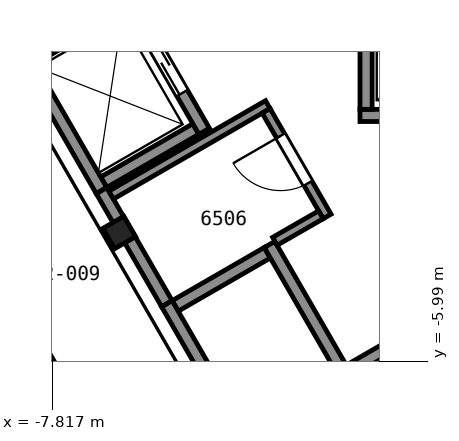
"""IFC4 building model, lengths in metres.
Left out: names, types, materials, properties, quantities, classifications, styles, units other than length and angle.
Written with IfcOpenShell. Run it as: python <this file> out.ifc"""

import sys

from ifc_helpers import new_model, si_unit, direction, frame, frame_2d, origin, origin_2d, place, context, subcontext, project, spatial, rectangle, i_section, extrude, element, fill, save


model = new_model("IFC4")
c1 = context("Model", 3, precision=1e-05, world=origin(), true_north=direction((0.0, 1.0)))
c2 = subcontext(c1, "Body", "Model", "MODEL_VIEW")
j1 = project(units=[si_unit("LENGTHUNIT", "METRE"), si_unit("PLANEANGLEUNIT", "RADIAN")], contexts=[c1])
p1 = place(None, origin())
s1 = spatial("IfcSite", under=j1, at=p1, CompositionType="ELEMENT")
p2 = place(p1, origin())
s2 = spatial("IfcBuilding", under=s1, at=p2, CompositionType="ELEMENT")
p3 = place(p2, frame((0.0, 0.0, 258.2)))
s3 = spatial("IfcBuildingStorey", under=s2, at=p3, CompositionType="ELEMENT", Elevation=258.2)
p4 = place(p3, frame((-6.923, -3.996, 0.04), z_axis=(0.175584774284, 0.101313376069, 0.979237247489), x_axis=(0.984300834882, 5.9817855e-05, -0.176498903317)))
e1 = element("IfcColumn", 1, at=p4, inside=s3, PredefinedType="COLUMN", context=c2, shape_type="SweptSolid", body=[
    extrude(i_section(OverallWidth=0.399, OverallDepth=0.386, WebThickness=0.021, FlangeThickness=0.033, FilletRadius=0.015, at=origin_2d()), origin(), (0.0, 0.0, 1.0), 5.841),
])
p5 = place(p3, frame((-2.755, -1.95, 0.0), z_axis=(0.0, 0.0, 1.0), x_axis=(1.0, 0.0, 0.0)))
e2 = element("IfcWall", 2, at=p5, inside=s3, PredefinedType="PARTITIONING", context=c2, shape_type="SweptSolid", body=[
    extrude(rectangle(XDim=7.25, YDim=0.2, at=frame_2d((3.625, 0.0))), origin(), (0.0, 0.0, 1.0), 5.55),
])
p6 = place(p5, frame((0.725, 0.0, 0.0)))
e3 = element("IfcOpeningElement", 3, at=p6, cuts=e2, PredefinedType="OPENING", context=c2, shape_type="SweptSolid", body=[
    extrude(rectangle(XDim=1.1, YDim=2.1, at=frame_2d((0.55, 1.05))), frame((0.0, 0.11, 0.0), z_axis=(0.0, -1.0, 0.0), x_axis=(1.0, 0.0, 0.0)), (0.0, 0.0, 1.0), 0.22),
])
p7 = place(p3, frame((-4.62, -7.118, 0.0), z_axis=(0.0, 0.0, 1.0), x_axis=(0.866039495442, 0.49997559174, 0.0)))
e4 = element("IfcWall", 4, at=p7, inside=s3, PredefinedType="PARTITIONING", context=c2, shape_type="SweptSolid", body=[
    extrude(rectangle(XDim=2.95, YDim=0.2, at=frame_2d((1.475, 0.0))), origin(), (0.0, 0.0, 1.0), 4.933),
])
for number, where, z_axis, x_axis in (
    (5, (-5.795, -5.083, 0.0), (0.0, 0.0, 1.0), (0.866, 0.5, 0.0)),
    (6, (-6.97, -3.048, 0.0), (0.0, 0.0, 1.0), (0.866, 0.5, 0.0)),
):
    element("IfcWall", number, at=place(p3, frame(where, z_axis=z_axis, x_axis=x_axis)), inside=s3, PredefinedType="PARTITIONING", context=c2, shape_type="SweptSolid", body=[
        extrude(rectangle(XDim=1.75, YDim=0.2, at=frame_2d((0.875, 0.0))), origin(), (0.0, 0.0, 1.0), 4.933),
    ])
p8 = place(p3, frame((-8.145, -1.013, 0.0), z_axis=(0.0, 0.0, 1.0), x_axis=(0.866016494683, 0.500015430699, 0.0)))
e7 = element("IfcWall", 7, at=p8, inside=s3, PredefinedType="PARTITIONING", context=c2, shape_type="SweptSolid", body=[
    extrude(rectangle(XDim=3.15, YDim=0.2, at=frame_2d((1.575, 0.0))), origin(), (0.0, 0.0, 1.0), 4.933),
])
p9 = place(p3, frame((-2.655, -1.85, 0.0), z_axis=(0.0, 0.0, 1.0), x_axis=(0.0, 1.0, 0.0)))
e8 = element("IfcWall", 8, at=p9, inside=s3, PredefinedType="PARTITIONING", context=c2, shape_type="SweptSolid", body=[
    extrude(rectangle(XDim=1.75, YDim=0.2, at=frame_2d((0.875, 0.0))), origin(), (0.0, 0.0, 1.0), 5.8),
])
p10 = place(p3, frame((-3.068, -6.107, 0.0), z_axis=(0.0, 0.0, 1.0), x_axis=(-0.499938297808, 0.866061024631, 0.0)))
e9 = element("IfcWall", 9, at=p10, inside=s3, PredefinedType="PARTITIONING", context=c2, shape_type="SweptSolid", body=[
    extrude(rectangle(XDim=2.35, YDim=0.2, at=frame_2d((1.175, 0.0))), origin(), (0.0, 0.0, 1.0), 5.55),
])
p11 = place(p3, frame((-5.318, -2.21, 0.0), z_axis=(0.0, 0.0, 1.0), x_axis=(-0.499938297808, 0.866061024631, 0.0)))
e10 = element("IfcWall", 10, at=p11, inside=s3, PredefinedType="PARTITIONING", context=c2, shape_type="SweptSolid", body=[
    extrude(rectangle(XDim=2.35, YDim=0.2, at=frame_2d((1.175, 0.0))), origin(), (0.0, 0.0, 1.0), 5.55),
])
p12 = place(p11, frame((0.725, 0.0, 0.0)))
e11 = element("IfcOpeningElement", 11, at=p12, cuts=e10, PredefinedType="OPENING", context=c2, shape_type="SweptSolid", body=[
    extrude(rectangle(XDim=1.1, YDim=2.1, at=frame_2d((0.55, 1.05))), frame((0.0, 0.11, 0.0), z_axis=(0.0, -1.0, 0.0), x_axis=(1.0, 0.0, 0.0)), (0.0, 0.0, 1.0), 0.22),
])
for number, where, z_axis, x_axis in (
    (12, (-4.656, -7.255, 0.0), (0.0, 0.0, 1.0), (-0.5, 0.866, 0.0)),
    (13, (-7.006, -3.185, 0.0), (0.0, 0.0, 1.0), (-0.5, 0.866, 0.0)),
):
    element("IfcWall", number, at=place(p3, frame(where, z_axis=z_axis, x_axis=x_axis)), inside=s3, PredefinedType="PARTITIONING", context=c2, shape_type="SweptSolid", body=[
        extrude(rectangle(XDim=2.55, YDim=0.2, at=frame_2d((1.275, 0.0))), origin(), (0.0, 0.0, 1.0), 5.55),
    ])
p13 = place(p3, frame((-7.005, -3.187, 0.0), z_axis=(0.0, 0.0, 1.0), x_axis=(0.50031363248, -0.86584425225, 0.0)))
e14 = element("IfcWall", 14, at=p13, inside=s3, PredefinedType="PARTITIONING", context=c2, shape_type="SweptSolid", body=[
    extrude(rectangle(XDim=2.145, YDim=0.2, at=frame_2d((1.072, 0.0))), origin(), (0.0, 0.0, 1.0), 5.19),
])
p14 = place(p3, frame((-6.847, -3.26, 0.0), z_axis=(0.0, 0.0, 1.0), x_axis=(0.866017493347, 0.500013701029, 0.0)))
e15 = element("IfcWall", 15, at=p14, inside=s3, PredefinedType="PARTITIONING", context=c2, shape_type="SweptSolid", body=[
    extrude(rectangle(XDim=2.975, YDim=0.15, at=frame_2d((1.488, 0.0))), origin(), (0.0, 0.0, 1.0), 4.933),
])
p15 = place(p3, frame((-3.295, -3.612, 0.0), z_axis=(0.0, 0.0, 1.0), x_axis=(-0.500105229699, 0.865964640864, 0.0)))
e16 = element("IfcWall", 16, at=p15, inside=s3, PredefinedType="PARTITIONING", context=c2, shape_type="SweptSolid", body=[
    extrude(rectangle(XDim=2.006, YDim=0.15, at=frame_2d((1.003, 0.0))), origin(), (0.0, 0.0, 1.0), 5.55),
])
p16 = place(p15, frame((0.631, 0.0, 0.0)))
e17 = element("IfcOpeningElement", 17, at=p16, cuts=e16, PredefinedType="OPENING", context=c2, shape_type="SweptSolid", body=[
    extrude(rectangle(XDim=0.9, YDim=2.1, at=frame_2d((0.45, 1.05))), frame((0.0, 0.085, 0.0), z_axis=(0.0, -1.0, 0.0), x_axis=(1.0, 0.0, 0.0)), (0.0, 0.0, 1.0), 0.17),
])
p17 = place(p3, frame((-4.154, -4.02, 0.0), z_axis=(0.0, 0.0, 1.0), x_axis=(0.866516116204, 0.499149096322, 0.0)))
e18 = element("IfcWall", 18, at=p17, inside=s3, PredefinedType="PARTITIONING", context=c2, shape_type="SweptSolid", body=[
    extrude(rectangle(XDim=0.873, YDim=0.15, at=frame_2d((0.436, 0.0))), origin(), (0.0, 0.0, 1.0), 5.55),
])
p18 = place(p3, frame((-13.605, 3.965, 0.0), z_axis=(0.0, 0.0, 1.0), x_axis=(0.499986289957, -0.866033319137, 0.0)))
e19 = element("IfcWall", 19, at=p18, inside=s3, PredefinedType="PARTITIONING", context=c2, shape_type="SweptSolid", body=[
    extrude(rectangle(XDim=19.731, YDim=0.125, at=frame_2d((9.866, 0.0))), origin(), (0.0, 0.0, 1.0), 4.462),
])
p19 = place(p12, origin())
e20 = element("IfcDoor", 20, at=p19, inside=s3, OperationType="SLIDING_TO_RIGHT", PredefinedType="DOOR", context=c2, shape_type="SweptSolid", body=[
    extrude(rectangle(XDim=1.1, YDim=2.1, at=frame_2d((0.55, 1.05))), frame((0.0, 0.025, 0.0), z_axis=(0.0, -1.0, 0.0), x_axis=(1.0, 0.0, 0.0)), (0.0, 0.0, 1.0), 0.05),
])
fill(e11, e20)
p20 = place(p16, origin())
e21 = element("IfcDoor", 21, at=p20, inside=s3, OperationType="SINGLE_SWING_RIGHT", PredefinedType="DOOR", context=c2, shape_type="SweptSolid", body=[
    extrude(rectangle(XDim=0.9, YDim=2.1, at=frame_2d((0.45, 1.05))), frame((0.0, 0.025, 0.0), z_axis=(0.0, -1.0, 0.0), x_axis=(1.0, 0.0, 0.0)), (0.0, 0.0, 1.0), 0.05),
])
fill(e17, e21)
save(model, sys.argv[1])
